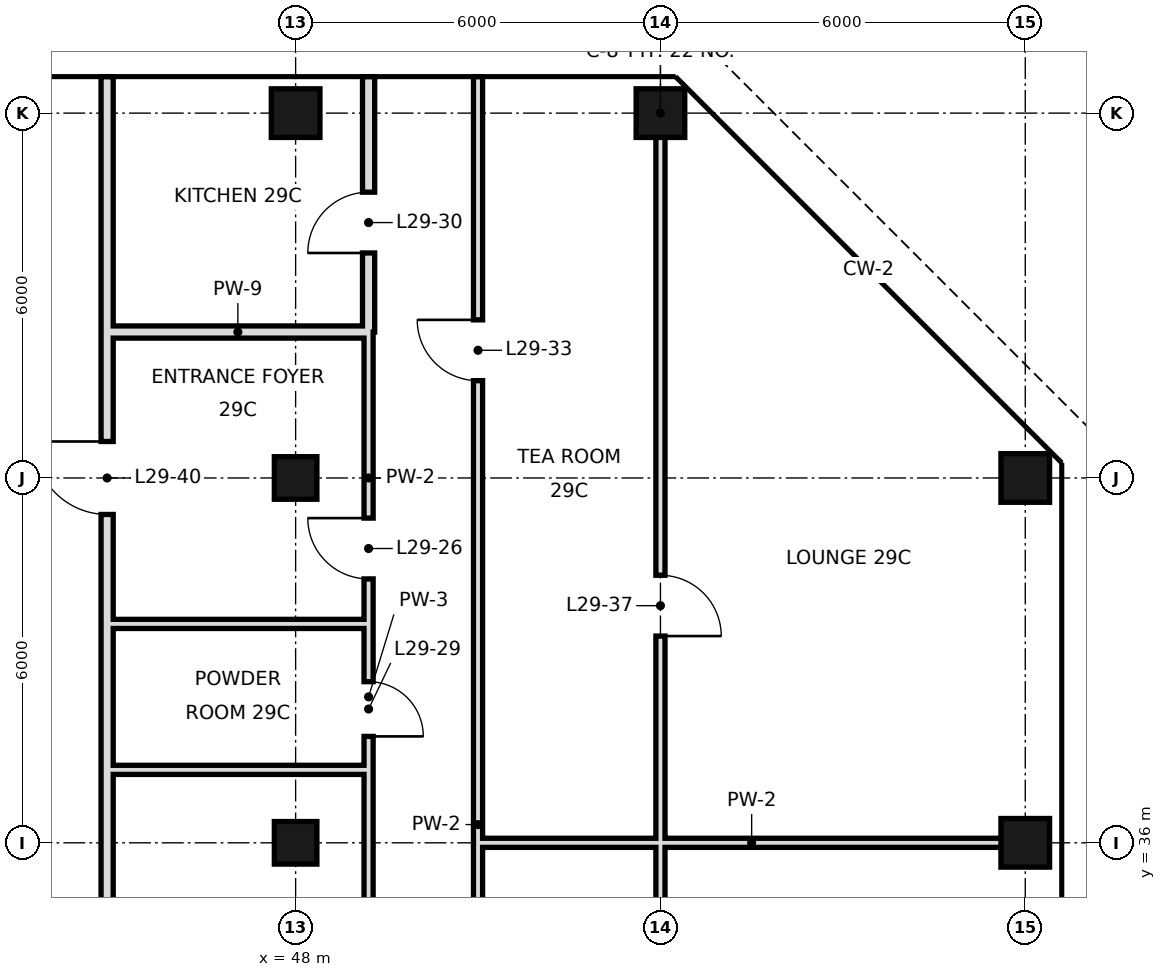
"""IFC4 building model, lengths in metres.
Left out: names, types, materials, properties, quantities, classifications, styles, units other than length and angle.
Written with IfcOpenShell. Run it as: python <this file> out.ifc"""

import sys

from ifc_helpers import new_model, si_unit, direction, frame, frame_2d, origin, origin_2d, place, context, subcontext, project, spatial, rectangle, hollow_rectangle, extrude, element, fill, save


model = new_model("IFC4")
c1 = context("Model", 3, precision=1e-05, world=origin(), true_north=direction((0.0, 1.0)))
c2 = subcontext(c1, "Body", "Model", "MODEL_VIEW")
j1 = project(units=[si_unit("LENGTHUNIT", "METRE"), si_unit("PLANEANGLEUNIT", "RADIAN")], contexts=[c1])
p1 = place(None, origin())
s1 = spatial("IfcSite", under=j1, at=p1, CompositionType="ELEMENT")
p2 = place(p1, origin())
s2 = spatial("IfcBuilding", under=s1, at=p2, CompositionType="ELEMENT")
p3 = place(p2, frame((0.0, 0.0, 130.4)))
s3 = spatial("IfcBuildingStorey", under=s2, at=p3, CompositionType="ELEMENT", Elevation=130.4)
for number, where, z_axis, x_axis in (
    (1, (48.0, 36.0, 0.0), (0.0, 0.0, 1.0), (1.0, 0.0, 0.0)),
    (2, (48.0, 42.0, 0.0), (0.0, 0.0, 1.0), (1.0, 0.0, 0.0)),
):
    element("IfcColumn", number, at=place(p3, frame(where, z_axis=z_axis, x_axis=x_axis)), inside=s3, PredefinedType="COLUMN", context=c2, shape_type="SweptSolid", body=[
        extrude(hollow_rectangle(XDim=0.7, YDim=0.7, WallThickness=0.036, at=origin_2d()), origin(), (0.0, 0.0, 1.0), 3.6),
    ])
for number, where, z_axis, x_axis in (
    (3, (48.0, 48.0, 0.0), (0.0, 0.0, 1.0), (1.0, 0.0, 0.0)),
    (4, (54.0, 48.0, 0.0), (0.0, 0.0, 1.0), (1.0, 0.0, 0.0)),
    (5, (60.0, 36.0, 0.0), (0.0, 0.0, 1.0), (1.0, 0.0, 0.0)),
    (6, (60.0, 42.0, 0.0), (0.0, 0.0, 1.0), (1.0, 0.0, 0.0)),
):
    element("IfcColumn", number, at=place(p3, frame(where, z_axis=z_axis, x_axis=x_axis)), inside=s3, PredefinedType="COLUMN", context=c2, shape_type="SweptSolid", body=[
        extrude(hollow_rectangle(XDim=0.8, YDim=0.8, WallThickness=0.04, at=origin_2d()), origin(), (0.0, 0.0, 1.0), 3.6),
    ])
p4 = place(p3, frame((44.9, 18.7, 0.0), z_axis=(0.0, 0.0, 1.0), x_axis=(0.0, 1.0, 0.0)))
e7 = element("IfcWall", 7, at=p4, inside=s3, PredefinedType="SOLIDWALL", context=c2, shape_type="SweptSolid", body=[
    extrude(rectangle(XDim=25.7, YDim=0.2, at=frame_2d((12.85, 0.0))), origin(), (0.0, 0.0, 1.0), 2.97),
])
p5 = place(p4, frame((22.7, 0.0, 0.0)))
e8 = element("IfcOpeningElement", 8, at=p5, cuts=e7, PredefinedType="OPENING", context=c2, shape_type="SweptSolid", body=[
    extrude(rectangle(XDim=1.2, YDim=2.4, at=frame_2d((0.6, 1.2))), frame((0.0, 0.11, 0.0), z_axis=(0.0, -1.0, 0.0), x_axis=(1.0, 0.0, 0.0)), (0.0, 0.0, 1.0), 0.22),
])
p6 = place(p3, frame((44.9, 44.4, 0.0), z_axis=(0.0, 0.0, 1.0), x_axis=(0.0, 1.0, 0.0)))
e9 = element("IfcWall", 9, at=p6, inside=s3, PredefinedType="SOLIDWALL", context=c2, shape_type="SweptSolid", body=[
    extrude(rectangle(XDim=4.2, YDim=0.2, at=frame_2d((2.1, 0.0))), origin(), (0.0, 0.0, 1.0), 2.72),
])
p7 = place(p3, frame((49.2, 44.4, 0.0), z_axis=(0.0, 0.0, 1.0), x_axis=(0.0, 1.0, 0.0)))
e10 = element("IfcWall", 10, at=p7, inside=s3, PredefinedType="SOLIDWALL", context=c2, shape_type="SweptSolid", body=[
    extrude(rectangle(XDim=4.2, YDim=0.2, at=frame_2d((2.1, 0.0))), origin(), (0.0, 0.0, 1.0), 2.97),
])
p8 = place(p7, frame((1.3, 0.0, 0.0)))
e11 = element("IfcOpeningElement", 11, at=p8, cuts=e10, PredefinedType="OPENING", context=c2, shape_type="SweptSolid", body=[
    extrude(rectangle(XDim=1.0, YDim=2.4, at=frame_2d((0.5, 1.2))), frame((0.0, 0.11, 0.0), z_axis=(0.0, -1.0, 0.0), x_axis=(1.0, 0.0, 0.0)), (0.0, 0.0, 1.0), 0.22),
])
p9 = place(p3, frame((49.2, 18.0, 0.0), z_axis=(0.0, 0.0, 1.0), x_axis=(0.0, 1.0, 0.0)))
e12 = element("IfcWall", 12, at=p9, inside=s3, PredefinedType="PARTITIONING", context=c2, shape_type="SweptSolid", body=[
    extrude(rectangle(XDim=19.2, YDim=0.15, at=frame_2d((9.6, 0.0))), origin(), (0.0, 0.0, 1.0), 3.42),
])
p10 = place(p9, frame((6.76, 0.0, 0.0)))
e13 = element("IfcOpeningElement", 13, at=p10, cuts=e12, PredefinedType="OPENING", context=c2, shape_type="SweptSolid", body=[
    extrude(rectangle(XDim=1.0, YDim=2.4, at=frame_2d((0.5, 1.2))), frame((0.0, 0.085, 0.0), z_axis=(0.0, -1.0, 0.0), x_axis=(1.0, 0.0, 0.0)), (0.0, 0.0, 1.0), 0.17),
])
p11 = place(p9, frame((13.12, 0.0, 0.0)))
e14 = element("IfcOpeningElement", 14, at=p11, cuts=e12, PredefinedType="OPENING", context=c2, shape_type="SweptSolid", body=[
    extrude(rectangle(XDim=1.0, YDim=2.4, at=frame_2d((0.5, 1.2))), frame((0.0, 0.085, 0.0), z_axis=(0.0, -1.0, 0.0), x_axis=(1.0, 0.0, 0.0)), (0.0, 0.0, 1.0), 0.17),
])
p12 = place(p3, frame((49.2, 39.6, 0.0), z_axis=(0.0, 0.0, 1.0), x_axis=(0.0, 1.0, 0.0)))
e15 = element("IfcWall", 15, at=p12, inside=s3, PredefinedType="PARTITIONING", context=c2, shape_type="SweptSolid", body=[
    extrude(rectangle(XDim=4.8, YDim=0.15, at=frame_2d((2.4, 0.0))), origin(), (0.0, 0.0, 1.0), 3.42),
])
p13 = place(p12, frame((0.74, 0.0, 0.0)))
e16 = element("IfcOpeningElement", 16, at=p13, cuts=e15, PredefinedType="OPENING", context=c2, shape_type="SweptSolid", body=[
    extrude(rectangle(XDim=1.0, YDim=2.4, at=frame_2d((0.5, 1.2))), frame((0.0, 0.085, 0.0), z_axis=(0.0, -1.0, 0.0), x_axis=(1.0, 0.0, 0.0)), (0.0, 0.0, 1.0), 0.17),
])
p14 = place(p3, frame((49.2, 37.2, 0.0), z_axis=(0.0, 0.0, 1.0), x_axis=(0.0, 1.0, 0.0)))
e17 = element("IfcWall", 17, at=p14, inside=s3, PredefinedType="PARTITIONING", context=c2, shape_type="SweptSolid", body=[
    extrude(rectangle(XDim=2.4, YDim=0.15, at=frame_2d((1.2, 0.0))), origin(), (0.0, 0.0, 1.0), 3.42),
])
p15 = place(p14, frame((0.55, 0.0, 0.0)))
e18 = element("IfcOpeningElement", 18, at=p15, cuts=e17, PredefinedType="OPENING", context=c2, shape_type="SweptSolid", body=[
    extrude(rectangle(XDim=0.9, YDim=2.4, at=frame_2d((0.45, 1.2))), frame((0.0, 0.085, 0.0), z_axis=(0.0, -1.0, 0.0), x_axis=(1.0, 0.0, 0.0)), (0.0, 0.0, 1.0), 0.17),
])
p16 = place(p3, frame((51.0, 24.0, 0.0), z_axis=(0.0, 0.0, 1.0), x_axis=(0.0, 1.0, 0.0)))
e19 = element("IfcWall", 19, at=p16, inside=s3, PredefinedType="PARTITIONING", context=c2, shape_type="SweptSolid", body=[
    extrude(rectangle(XDim=24.6, YDim=0.15, at=frame_2d((12.3, 0.0))), origin(), (0.0, 0.0, 1.0), 3.42),
])
p17 = place(p16, frame((5.1, 0.0, 0.0)))
e20 = element("IfcOpeningElement", 20, at=p17, cuts=e19, PredefinedType="OPENING", context=c2, shape_type="SweptSolid", body=[
    extrude(rectangle(XDim=1.8, YDim=2.4, at=frame_2d((0.9, 1.2))), frame((0.0, 0.085, 0.0), z_axis=(0.0, -1.0, 0.0), x_axis=(1.0, 0.0, 0.0)), (0.0, 0.0, 1.0), 0.17),
])
p18 = place(p16, frame((19.6, 0.0, 0.0)))
e21 = element("IfcOpeningElement", 21, at=p18, cuts=e19, PredefinedType="OPENING", context=c2, shape_type="SweptSolid", body=[
    extrude(rectangle(XDim=1.0, YDim=2.4, at=frame_2d((0.5, 1.2))), frame((0.0, 0.085, 0.0), z_axis=(0.0, -1.0, 0.0), x_axis=(1.0, 0.0, 0.0)), (0.0, 0.0, 1.0), 0.17),
])
p19 = place(p3, frame((54.0, 24.0, 0.0), z_axis=(0.0, 0.0, 1.0), x_axis=(0.0, 1.0, 0.0)))
e22 = element("IfcWall", 22, at=p19, inside=s3, PredefinedType="PARTITIONING", context=c2, shape_type="SweptSolid", body=[
    extrude(rectangle(XDim=24.0, YDim=0.15, at=frame_2d((12.0, 0.0))), origin(), (0.0, 0.0, 1.0), 3.42),
])
p20 = place(p19, frame((5.1, 0.0, 0.0)))
e23 = element("IfcOpeningElement", 23, at=p20, cuts=e22, PredefinedType="OPENING", context=c2, shape_type="SweptSolid", body=[
    extrude(rectangle(XDim=1.8, YDim=2.4, at=frame_2d((0.9, 1.2))), frame((0.0, 0.085, 0.0), z_axis=(0.0, -1.0, 0.0), x_axis=(1.0, 0.0, 0.0)), (0.0, 0.0, 1.0), 0.17),
])
p21 = place(p19, frame((15.4, 0.0, 0.0)))
e24 = element("IfcOpeningElement", 24, at=p21, cuts=e22, PredefinedType="OPENING", context=c2, shape_type="SweptSolid", body=[
    extrude(rectangle(XDim=1.0, YDim=2.4, at=frame_2d((0.5, 1.2))), frame((0.0, 0.085, 0.0), z_axis=(0.0, -1.0, 0.0), x_axis=(1.0, 0.0, 0.0)), (0.0, 0.0, 1.0), 0.17),
])
p22 = place(p3, frame((51.0, 36.0, 0.0), z_axis=(0.0, 0.0, 1.0), x_axis=(1.0, 0.0, 0.0)))
e25 = element("IfcWall", 25, at=p22, inside=s3, PredefinedType="PARTITIONING", context=c2, shape_type="SweptSolid", body=[
    extrude(rectangle(XDim=9.0, YDim=0.15, at=frame_2d((4.5, 0.0))), origin(), (0.0, 0.0, 1.0), 2.72),
])
for number, where, z_axis, x_axis in (
    (26, (44.9, 37.2, 0.0), (0.0, 0.0, 1.0), (1.0, 0.0, 0.0)),
    (27, (44.9, 39.6, 0.0), (0.0, 0.0, 1.0), (1.0, 0.0, 0.0)),
):
    element("IfcWall", number, at=place(p3, frame(where, z_axis=z_axis, x_axis=x_axis)), inside=s3, PredefinedType="PARTITIONING", context=c2, shape_type="SweptSolid", body=[
        extrude(rectangle(XDim=4.3, YDim=0.15, at=frame_2d((2.15, 0.0))), origin(), (0.0, 0.0, 1.0), 3.42),
    ])
p23 = place(p3, frame((44.9, 44.4, 0.0), z_axis=(0.0, 0.0, 1.0), x_axis=(1.0, 0.0, 0.0)))
e28 = element("IfcWall", 28, at=p23, inside=s3, PredefinedType="SOLIDWALL", context=c2, shape_type="SweptSolid", body=[
    extrude(rectangle(XDim=4.3, YDim=0.2, at=frame_2d((2.15, 0.0))), origin(), (0.0, 0.0, 1.0), 2.97),
])
p24 = place(p13, frame((1.0, 0.0, 0.0), z_axis=(0.0, 0.0, 1.0), x_axis=(-1.0, 0.0, 0.0)))
e29 = element("IfcDoor", 29, at=p24, inside=s3, OperationType="SINGLE_SWING_LEFT", PredefinedType="DOOR", context=c2, shape_type="SweptSolid", body=[
    extrude(rectangle(XDim=1.0, YDim=2.4, at=frame_2d((0.5, 1.2))), frame((0.0, 0.025, 0.0), z_axis=(0.0, -1.0, 0.0), x_axis=(1.0, 0.0, 0.0)), (0.0, 0.0, 1.0), 0.05),
])
fill(e16, e29)
p25 = place(p15, frame((0.9, 0.0, 0.0), z_axis=(0.0, 0.0, 1.0), x_axis=(-1.0, 0.0, 0.0)))
e30 = element("IfcDoor", 30, at=p25, inside=s3, OperationType="SINGLE_SWING_RIGHT", PredefinedType="DOOR", context=c2, shape_type="SweptSolid", body=[
    extrude(rectangle(XDim=0.9, YDim=2.4, at=frame_2d((0.45, 1.2))), frame((0.0, 0.025, 0.0), z_axis=(0.0, -1.0, 0.0), x_axis=(1.0, 0.0, 0.0)), (0.0, 0.0, 1.0), 0.05),
])
fill(e18, e30)
p26 = place(p8, origin())
e31 = element("IfcDoor", 31, at=p26, inside=s3, OperationType="SINGLE_SWING_LEFT", PredefinedType="DOOR", context=c2, shape_type="SweptSolid", body=[
    extrude(rectangle(XDim=1.0, YDim=2.4, at=frame_2d((0.5, 1.2))), frame((0.0, 0.025, 0.0), z_axis=(0.0, -1.0, 0.0), x_axis=(1.0, 0.0, 0.0)), (0.0, 0.0, 1.0), 0.05),
])
fill(e11, e31)
p27 = place(p18, frame((1.0, 0.0, 0.0), z_axis=(0.0, 0.0, 1.0), x_axis=(-1.0, 0.0, 0.0)))
e32 = element("IfcDoor", 32, at=p27, inside=s3, OperationType="SINGLE_SWING_LEFT", PredefinedType="DOOR", context=c2, shape_type="SweptSolid", body=[
    extrude(rectangle(XDim=1.0, YDim=2.4, at=frame_2d((0.5, 1.2))), frame((0.0, 0.025, 0.0), z_axis=(0.0, -1.0, 0.0), x_axis=(1.0, 0.0, 0.0)), (0.0, 0.0, 1.0), 0.05),
])
fill(e21, e32)
p28 = place(p21, frame((1.0, 0.0, 0.0), z_axis=(0.0, 0.0, 1.0), x_axis=(-1.0, 0.0, 0.0)))
e33 = element("IfcDoor", 33, at=p28, inside=s3, OperationType="SINGLE_SWING_RIGHT", PredefinedType="DOOR", context=c2, shape_type="SweptSolid", body=[
    extrude(rectangle(XDim=1.0, YDim=2.4, at=frame_2d((0.5, 1.2))), frame((0.0, 0.025, 0.0), z_axis=(0.0, -1.0, 0.0), x_axis=(1.0, 0.0, 0.0)), (0.0, 0.0, 1.0), 0.05),
])
fill(e24, e33)
p29 = place(p5, frame((1.2, 0.0, 0.0), z_axis=(0.0, 0.0, 1.0), x_axis=(-1.0, 0.0, 0.0)))
e34 = element("IfcDoor", 34, at=p29, inside=s3, OperationType="SINGLE_SWING_LEFT", PredefinedType="DOOR", context=c2, shape_type="SweptSolid", body=[
    extrude(rectangle(XDim=1.2, YDim=2.4, at=frame_2d((0.6, 1.2))), frame((0.0, 0.025, 0.0), z_axis=(0.0, -1.0, 0.0), x_axis=(1.0, 0.0, 0.0)), (0.0, 0.0, 1.0), 0.05),
])
fill(e8, e34)
save(model, sys.argv[1])
